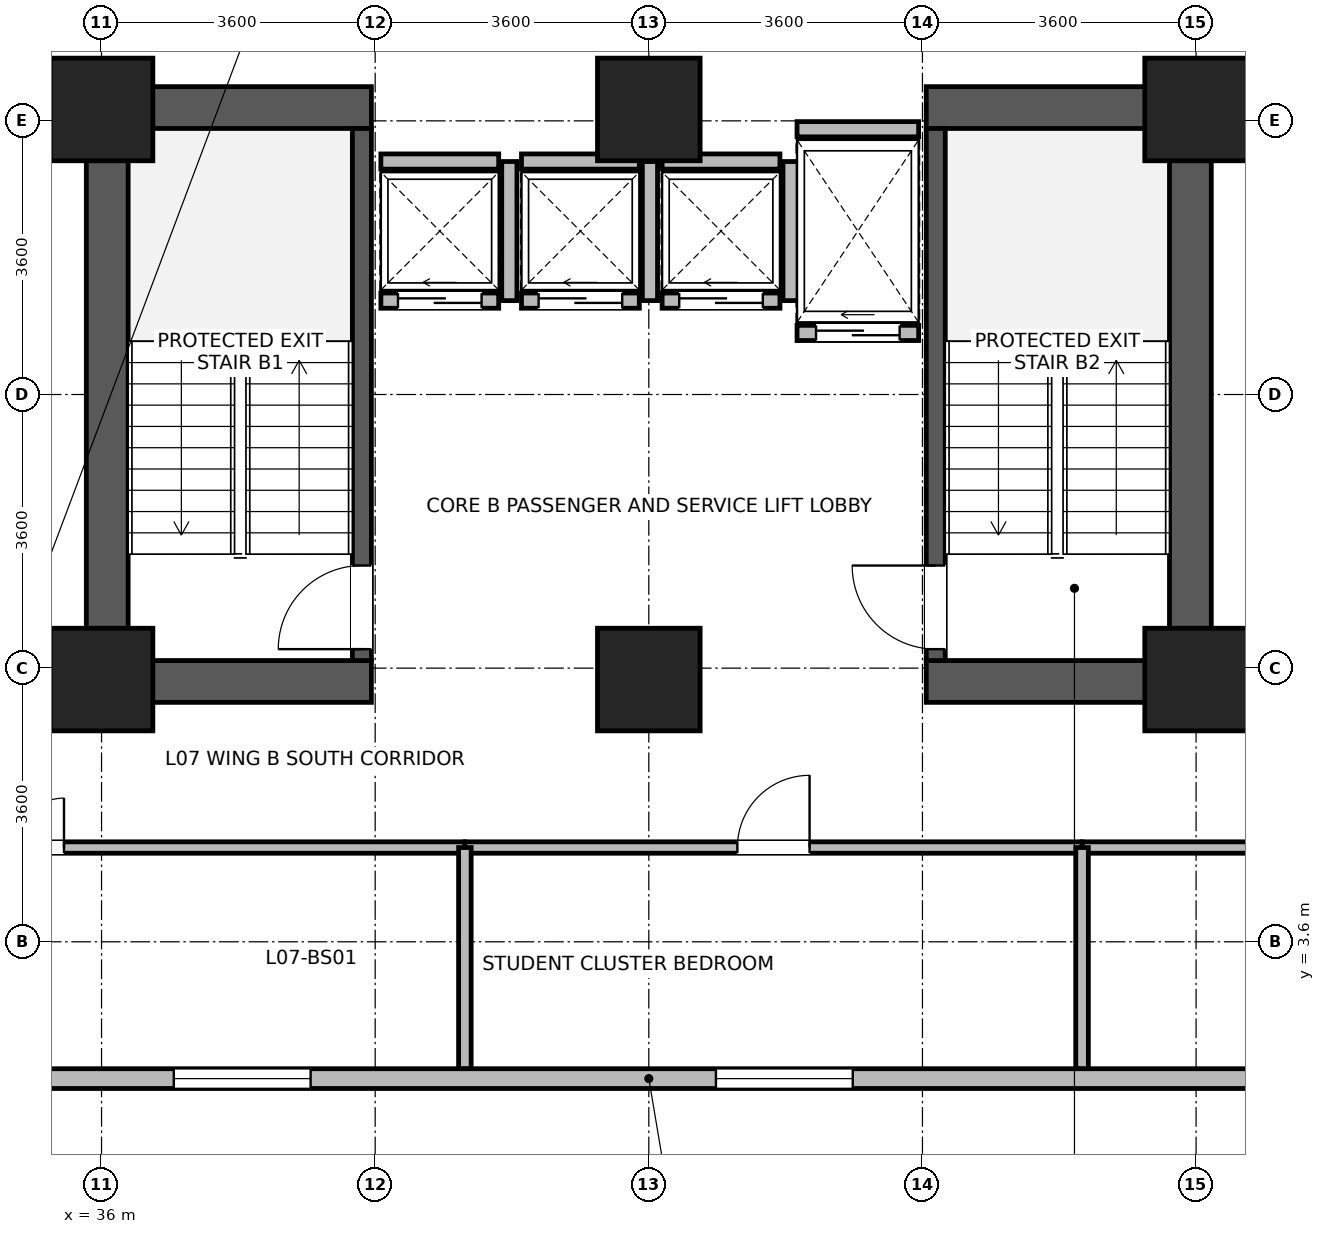
"""IFC4 building model, lengths in metres.
Left out: names, types, materials, properties, quantities, classifications, styles, units other than length and angle.
Written with IfcOpenShell. Run it as: python <this file> out.ifc"""

import sys

from ifc_helpers import new_model, si_unit, direction, frame, frame_2d, origin, origin_2d, place, context, subcontext, project, spatial, rectangle, extrude, source, transform, mapped, element, fill, save


model = new_model("IFC4")
c1 = context("Model", 3, precision=1e-05, world=origin(), true_north=direction((0.0, 1.0)))
c2 = subcontext(c1, "Body", "Model", "MODEL_VIEW")
j1 = project(units=[si_unit("LENGTHUNIT", "METRE"), si_unit("PLANEANGLEUNIT", "RADIAN")], contexts=[c1])
p1 = place(None, origin())
s1 = spatial("IfcSite", under=j1, at=p1, CompositionType="ELEMENT")
p2 = place(p1, origin())
s2 = spatial("IfcBuilding", under=s1, at=p2, CompositionType="ELEMENT")
p3 = place(p2, frame((0.0, 0.0, 32.7)))
s3 = spatial("IfcBuildingStorey", under=s2, at=p3, CompositionType="ELEMENT", Elevation=32.7)
for number, where, z_axis, x_axis in (
    (1, (36.075, 6.75, 0.0), (0.0, 0.0, 1.0), (0.0, 1.0, 0.0)),
    (2, (50.325, 6.75, 0.0), (0.0, 0.0, 1.0), (0.0, 1.0, 0.0)),
):
    element("IfcWall", number, at=place(p3, frame(where, z_axis=z_axis, x_axis=x_axis)), inside=s3, PredefinedType="SHEAR", context=c2, shape_type="SweptSolid", body=[
        extrude(rectangle(XDim=8.1, YDim=0.55, at=frame_2d((4.05, 0.0))), origin(), (0.0, 0.0, 1.0), 3.45),
    ])
for number, where, z_axis, x_axis in (
    (3, (36.35, 7.025, 0.0), (0.0, 0.0, 1.0), (1.0, 0.0, 0.0)),
    (4, (46.85, 7.025, 0.0), (0.0, 0.0, 1.0), (1.0, 0.0, 0.0)),
    (5, (36.35, 14.575, 0.0), (0.0, 0.0, 1.0), (1.0, 0.0, 0.0)),
    (6, (46.85, 14.575, 0.0), (0.0, 0.0, 1.0), (1.0, 0.0, 0.0)),
):
    element("IfcWall", number, at=place(p3, frame(where, z_axis=z_axis, x_axis=x_axis)), inside=s3, PredefinedType="SHEAR", context=c2, shape_type="SweptSolid", body=[
        extrude(rectangle(XDim=3.2, YDim=0.55, at=frame_2d((1.6, 0.0))), origin(), (0.0, 0.0, 1.0), 3.45),
    ])
p4 = place(p3, frame((39.425, 7.3, 0.0), z_axis=(0.0, 0.0, 1.0), x_axis=(0.0, 1.0, 0.0)))
e7 = element("IfcWall", 7, at=p4, inside=s3, PredefinedType="SHEAR", context=c2, shape_type="SweptSolid", body=[
    extrude(rectangle(XDim=7.0, YDim=0.25, at=frame_2d((3.5, 0.0))), origin(), (0.0, 0.0, 1.0), 3.45),
])
p5 = place(p4, frame((0.15, 0.0, 0.0)))
e8 = element("IfcOpeningElement", 8, at=p5, cuts=e7, PredefinedType="OPENING", context=c2, shape_type="SweptSolid", body=[
    extrude(rectangle(XDim=1.1, YDim=2.08, at=frame_2d((0.55, 1.04))), frame((0.0, 0.135, 0.0), z_axis=(0.0, -1.0, 0.0), x_axis=(1.0, 0.0, 0.0)), (0.0, 0.0, 1.0), 0.27),
])
p6 = place(p3, frame((46.975, 7.3, 0.0), z_axis=(0.0, 0.0, 1.0), x_axis=(0.0, 1.0, 0.0)))
e9 = element("IfcWall", 9, at=p6, inside=s3, PredefinedType="SHEAR", context=c2, shape_type="SweptSolid", body=[
    extrude(rectangle(XDim=7.0, YDim=0.25, at=frame_2d((3.5, 0.0))), origin(), (0.0, 0.0, 1.0), 3.45),
])
p7 = place(p6, frame((0.15, 0.0, 0.0)))
e10 = element("IfcOpeningElement", 10, at=p7, cuts=e9, PredefinedType="OPENING", context=c2, shape_type="SweptSolid", body=[
    extrude(rectangle(XDim=1.1, YDim=2.08, at=frame_2d((0.55, 1.04))), frame((0.0, 0.135, 0.0), z_axis=(0.0, -1.0, 0.0), x_axis=(1.0, 0.0, 0.0)), (0.0, 0.0, 1.0), 0.27),
])
m1 = source(origin(), c2, "Body", "SweptSolid", [
    extrude(rectangle(XDim=1.35, YDim=1.35, at=origin_2d()), origin(), (0.0, 0.0, 1.0), 3.7),
])
for number, where, z_axis, x_axis in (
    (11, (36.0, 7.05, 0.0), (0.0, 0.0, 1.0), (1.0, 0.0, 0.0)),
    (12, (36.0, 14.55, 0.0), (0.0, 0.0, 1.0), (1.0, 0.0, 0.0)),
    (13, (43.2, 7.05, 0.0), (0.0, 0.0, 1.0), (1.0, 0.0, 0.0)),
    (14, (43.2, 14.55, 0.0), (0.0, 0.0, 1.0), (1.0, 0.0, 0.0)),
    (15, (50.4, 7.05, 0.0), (0.0, 0.0, 1.0), (1.0, 0.0, 0.0)),
    (16, (50.4, 14.55, 0.0), (0.0, 0.0, 1.0), (1.0, 0.0, 0.0)),
):
    element("IfcColumn", number, at=place(p3, frame(where, z_axis=z_axis, x_axis=x_axis)), inside=s3, PredefinedType="COLUMN", context=c2, shape_type="MappedRepresentation", body=[
        mapped(m1, transform((0.0, 0.0, 0.0), x_axis=(1.0, 0.0, 0.0), y_axis=(0.0, 1.0, 0.0), z_axis=(0.0, 0.0, 1.0), scale=1.0)),
    ])
p8 = place(p3, frame((57.465, 1.8, 0.0), z_axis=(0.0, 0.0, 1.0), x_axis=(-1.0, 0.0, 0.0)))
e17 = element("IfcWall", 17, at=p8, inside=s3, PredefinedType="STANDARD", context=c2, shape_type="SweptSolid", body=[
    extrude(rectangle(XDim=28.53, YDim=0.26, at=frame_2d((14.265, 0.0))), origin(), (0.0, 0.0, 1.0), 3.43),
])
p9 = place(p8, frame((0.883, 0.0, 0.85)))
e18 = element("IfcOpeningElement", 18, at=p9, cuts=e17, PredefinedType="OPENING", context=c2, shape_type="SweptSolid", body=[
    extrude(rectangle(XDim=1.8, YDim=1.85, at=frame_2d((0.9, 0.925))), frame((0.0, 0.14, 0.0), z_axis=(0.0, -1.0, 0.0), x_axis=(1.0, 0.0, 0.0)), (0.0, 0.0, 1.0), 0.28),
])
p10 = place(p8, frame((4.449, 0.0, 0.85)))
e19 = element("IfcOpeningElement", 19, at=p10, cuts=e17, PredefinedType="OPENING", context=c2, shape_type="SweptSolid", body=[
    extrude(rectangle(XDim=1.8, YDim=1.85, at=frame_2d((0.9, 0.925))), frame((0.0, 0.14, 0.0), z_axis=(0.0, -1.0, 0.0), x_axis=(1.0, 0.0, 0.0)), (0.0, 0.0, 1.0), 0.28),
])
p11 = place(p8, frame((11.582, 0.0, 0.85)))
e20 = element("IfcOpeningElement", 20, at=p11, cuts=e17, PredefinedType="OPENING", context=c2, shape_type="SweptSolid", body=[
    extrude(rectangle(XDim=1.8, YDim=1.85, at=frame_2d((0.9, 0.925))), frame((0.0, 0.14, 0.0), z_axis=(0.0, -1.0, 0.0), x_axis=(1.0, 0.0, 0.0)), (0.0, 0.0, 1.0), 0.28),
])
p12 = place(p8, frame((18.714, 0.0, 0.85)))
e21 = element("IfcOpeningElement", 21, at=p12, cuts=e17, PredefinedType="OPENING", context=c2, shape_type="SweptSolid", body=[
    extrude(rectangle(XDim=1.8, YDim=1.85, at=frame_2d((0.9, 0.925))), frame((0.0, 0.14, 0.0), z_axis=(0.0, -1.0, 0.0), x_axis=(1.0, 0.0, 0.0)), (0.0, 0.0, 1.0), 0.28),
])
p13 = place(p8, frame((22.281, 0.0, 0.85)))
e22 = element("IfcOpeningElement", 22, at=p13, cuts=e17, PredefinedType="OPENING", context=c2, shape_type="SweptSolid", body=[
    extrude(rectangle(XDim=1.8, YDim=1.85, at=frame_2d((0.9, 0.925))), frame((0.0, 0.14, 0.0), z_axis=(0.0, -1.0, 0.0), x_axis=(1.0, 0.0, 0.0)), (0.0, 0.0, 1.0), 0.28),
])
p14 = place(p8, frame((25.847, 0.0, 0.85)))
e23 = element("IfcOpeningElement", 23, at=p14, cuts=e17, PredefinedType="OPENING", context=c2, shape_type="SweptSolid", body=[
    extrude(rectangle(XDim=1.8, YDim=1.85, at=frame_2d((0.9, 0.925))), frame((0.0, 0.14, 0.0), z_axis=(0.0, -1.0, 0.0), x_axis=(1.0, 0.0, 0.0)), (0.0, 0.0, 1.0), 0.28),
])
p15 = place(p3, frame((39.675, 12.035, 0.0), z_axis=(0.0, 0.0, 1.0), x_axis=(1.0, 0.0, 0.0)))
e24 = element("IfcWall", 24, at=p15, inside=s3, PredefinedType="PARTITIONING", context=c2, shape_type="SweptSolid", body=[
    extrude(rectangle(XDim=1.55, YDim=0.2, at=frame_2d((0.775, 0.0))), origin(), (0.0, 0.0, 1.0), 3.43),
])
p16 = place(p15, frame((0.225, 0.0, 0.0)))
e25 = element("IfcOpeningElement", 25, at=p16, cuts=e24, PredefinedType="OPENING", context=c2, shape_type="SweptSolid", body=[
    extrude(rectangle(XDim=1.1, YDim=2.12, at=frame_2d((0.55, 1.06))), frame((0.0, 0.11, 0.0), z_axis=(0.0, -1.0, 0.0), x_axis=(1.0, 0.0, 0.0)), (0.0, 0.0, 1.0), 0.22),
])
p17 = place(p3, frame((39.675, 13.865, 0.0), z_axis=(0.0, 0.0, 1.0), x_axis=(1.0, 0.0, 0.0)))
e26 = element("IfcWall", 26, at=p17, inside=s3, PredefinedType="PARTITIONING", context=c2, shape_type="SweptSolid", body=[
    extrude(rectangle(XDim=1.55, YDim=0.2, at=frame_2d((0.775, 0.0))), origin(), (0.0, 0.0, 1.0), 3.43),
])
p18 = place(p3, frame((41.365, 12.035, 0.0), z_axis=(0.0, 0.0, 1.0), x_axis=(0.0, 1.0, 0.0)))
e27 = element("IfcWall", 27, at=p18, inside=s3, PredefinedType="PARTITIONING", context=c2, shape_type="SweptSolid", body=[
    extrude(rectangle(XDim=1.83, YDim=0.2, at=frame_2d((0.915, 0.0))), origin(), (0.0, 0.0, 1.0), 3.43),
])
p19 = place(p3, frame((41.525, 12.035, 0.0), z_axis=(0.0, 0.0, 1.0), x_axis=(1.0, 0.0, 0.0)))
e28 = element("IfcWall", 28, at=p19, inside=s3, PredefinedType="PARTITIONING", context=c2, shape_type="SweptSolid", body=[
    extrude(rectangle(XDim=1.55, YDim=0.2, at=frame_2d((0.775, 0.0))), origin(), (0.0, 0.0, 1.0), 3.43),
])
p20 = place(p19, frame((0.225, 0.0, 0.0)))
e29 = element("IfcOpeningElement", 29, at=p20, cuts=e28, PredefinedType="OPENING", context=c2, shape_type="SweptSolid", body=[
    extrude(rectangle(XDim=1.1, YDim=2.12, at=frame_2d((0.55, 1.06))), frame((0.0, 0.11, 0.0), z_axis=(0.0, -1.0, 0.0), x_axis=(1.0, 0.0, 0.0)), (0.0, 0.0, 1.0), 0.22),
])
p21 = place(p3, frame((41.525, 13.865, 0.0), z_axis=(0.0, 0.0, 1.0), x_axis=(1.0, 0.0, 0.0)))
e30 = element("IfcWall", 30, at=p21, inside=s3, PredefinedType="PARTITIONING", context=c2, shape_type="SweptSolid", body=[
    extrude(rectangle(XDim=1.55, YDim=0.2, at=frame_2d((0.775, 0.0))), origin(), (0.0, 0.0, 1.0), 3.43),
])
p22 = place(p3, frame((43.215, 12.035, 0.0), z_axis=(0.0, 0.0, 1.0), x_axis=(0.0, 1.0, 0.0)))
e31 = element("IfcWall", 31, at=p22, inside=s3, PredefinedType="PARTITIONING", context=c2, shape_type="SweptSolid", body=[
    extrude(rectangle(XDim=1.83, YDim=0.2, at=frame_2d((0.915, 0.0))), origin(), (0.0, 0.0, 1.0), 3.43),
])
p23 = place(p3, frame((43.375, 12.035, 0.0), z_axis=(0.0, 0.0, 1.0), x_axis=(1.0, 0.0, 0.0)))
e32 = element("IfcWall", 32, at=p23, inside=s3, PredefinedType="PARTITIONING", context=c2, shape_type="SweptSolid", body=[
    extrude(rectangle(XDim=1.55, YDim=0.2, at=frame_2d((0.775, 0.0))), origin(), (0.0, 0.0, 1.0), 3.43),
])
p24 = place(p23, frame((0.225, 0.0, 0.0)))
e33 = element("IfcOpeningElement", 33, at=p24, cuts=e32, PredefinedType="OPENING", context=c2, shape_type="SweptSolid", body=[
    extrude(rectangle(XDim=1.1, YDim=2.12, at=frame_2d((0.55, 1.06))), frame((0.0, 0.11, 0.0), z_axis=(0.0, -1.0, 0.0), x_axis=(1.0, 0.0, 0.0)), (0.0, 0.0, 1.0), 0.22),
])
p25 = place(p3, frame((43.375, 13.865, 0.0), z_axis=(0.0, 0.0, 1.0), x_axis=(1.0, 0.0, 0.0)))
e34 = element("IfcWall", 34, at=p25, inside=s3, PredefinedType="PARTITIONING", context=c2, shape_type="SweptSolid", body=[
    extrude(rectangle(XDim=1.55, YDim=0.2, at=frame_2d((0.775, 0.0))), origin(), (0.0, 0.0, 1.0), 3.43),
])
p26 = place(p3, frame((45.065, 12.035, 0.0), z_axis=(0.0, 0.0, 1.0), x_axis=(0.0, 1.0, 0.0)))
e35 = element("IfcWall", 35, at=p26, inside=s3, PredefinedType="PARTITIONING", context=c2, shape_type="SweptSolid", body=[
    extrude(rectangle(XDim=1.83, YDim=0.2, at=frame_2d((0.915, 0.0))), origin(), (0.0, 0.0, 1.0), 3.43),
])
p27 = place(p3, frame((45.15, 11.61, 0.0), z_axis=(0.0, 0.0, 1.0), x_axis=(1.0, 0.0, 0.0)))
e36 = element("IfcWall", 36, at=p27, inside=s3, PredefinedType="PARTITIONING", context=c2, shape_type="SweptSolid", body=[
    extrude(rectangle(XDim=1.6, YDim=0.2, at=frame_2d((0.8, 0.0))), origin(), (0.0, 0.0, 1.0), 3.43),
])
p28 = place(p27, frame((0.25, 0.0, 0.0)))
e37 = element("IfcOpeningElement", 37, at=p28, cuts=e36, PredefinedType="OPENING", context=c2, shape_type="SweptSolid", body=[
    extrude(rectangle(XDim=1.1, YDim=2.12, at=frame_2d((0.55, 1.06))), frame((0.0, 0.11, 0.0), z_axis=(0.0, -1.0, 0.0), x_axis=(1.0, 0.0, 0.0)), (0.0, 0.0, 1.0), 0.22),
])
p29 = place(p3, frame((45.15, 14.29, 0.0), z_axis=(0.0, 0.0, 1.0), x_axis=(1.0, 0.0, 0.0)))
e38 = element("IfcWall", 38, at=p29, inside=s3, PredefinedType="PARTITIONING", context=c2, shape_type="SweptSolid", body=[
    extrude(rectangle(XDim=1.6, YDim=0.2, at=frame_2d((0.8, 0.0))), origin(), (0.0, 0.0, 1.0), 2.23),
])
p30 = place(p3, frame((28.932, 4.84, 0.0), z_axis=(0.0, 0.0, 1.0), x_axis=(1.0, 0.0, 0.0)))
e39 = element("IfcWall", 39, at=p30, inside=s3, PredefinedType="PARTITIONING", context=c2, shape_type="SweptSolid", body=[
    extrude(rectangle(XDim=11.848, YDim=0.15, at=frame_2d((5.924, 0.0))), origin(), (0.0, 0.0, 1.0), 3.43),
])
p31 = place(p30, frame((5.274, 0.0, 0.0)))
e40 = element("IfcOpeningElement", 40, at=p31, cuts=e39, PredefinedType="OPENING", context=c2, shape_type="SweptSolid", body=[
    extrude(rectangle(XDim=1.3, YDim=2.12, at=frame_2d((0.65, 1.06))), frame((0.0, 0.085, 0.0), z_axis=(0.0, -1.0, 0.0), x_axis=(1.0, 0.0, 0.0)), (0.0, 0.0, 1.0), 0.17),
])
p32 = place(p3, frame((48.9, 4.84, 0.0), z_axis=(0.0, 0.0, 1.0), x_axis=(1.0, 0.0, 0.0)))
e41 = element("IfcWall", 41, at=p32, inside=s3, PredefinedType="PARTITIONING", context=c2, shape_type="SweptSolid", body=[
    extrude(rectangle(XDim=8.568, YDim=0.15, at=frame_2d((4.284, 0.0))), origin(), (0.0, 0.0, 1.0), 3.43),
])
p33 = place(p32, frame((3.809, 0.0, 0.0)))
e42 = element("IfcOpeningElement", 42, at=p33, cuts=e41, PredefinedType="OPENING", context=c2, shape_type="SweptSolid", body=[
    extrude(rectangle(XDim=0.95, YDim=2.1, at=frame_2d((0.475, 1.05))), frame((0.0, 0.085, 0.0), z_axis=(0.0, -1.0, 0.0), x_axis=(1.0, 0.0, 0.0)), (0.0, 0.0, 1.0), 0.17),
])
p34 = place(p3, frame((40.78, 4.84, 0.0), z_axis=(0.0, 0.0, 1.0), x_axis=(1.0, 0.0, 0.0)))
e43 = element("IfcWall", 43, at=p34, inside=s3, PredefinedType="PARTITIONING", context=c2, shape_type="SweptSolid", body=[
    extrude(rectangle(XDim=8.12, YDim=0.15, at=frame_2d((4.06, 0.0))), origin(), (0.0, 0.0, 1.0), 3.43),
])
p35 = place(p34, frame((3.585, 0.0, 0.0)))
e44 = element("IfcOpeningElement", 44, at=p35, cuts=e43, PredefinedType="OPENING", context=c2, shape_type="SweptSolid", body=[
    extrude(rectangle(XDim=0.95, YDim=2.1, at=frame_2d((0.475, 1.05))), frame((0.0, 0.085, 0.0), z_axis=(0.0, -1.0, 0.0), x_axis=(1.0, 0.0, 0.0)), (0.0, 0.0, 1.0), 0.17),
])
for number, where, z_axis, x_axis in (
    (45, (40.78, 1.932, 0.0), (0.0, 0.0, 1.0), (0.0, 1.0, 0.0)),
    (46, (48.9, 1.932, 0.0), (0.0, 0.0, 1.0), (0.0, 1.0, 0.0)),
):
    element("IfcWall", number, at=place(p3, frame(where, z_axis=z_axis, x_axis=x_axis)), inside=s3, PredefinedType="PARTITIONING", context=c2, shape_type="SweptSolid", body=[
        extrude(rectangle(XDim=2.908, YDim=0.165, at=frame_2d((1.454, 0.0))), origin(), (0.0, 0.0, 1.0), 3.43),
    ])
p36 = place(p11, origin())
e47 = element("IfcWindow", 47, at=p36, inside=s3, PartitioningType="SINGLE_PANEL", PredefinedType="WINDOW", context=c2, shape_type="SweptSolid", body=[
    extrude(rectangle(XDim=1.8, YDim=1.85, at=frame_2d((0.9, 0.925))), frame((0.0, 0.03, 0.0), z_axis=(0.0, -1.0, 0.0), x_axis=(1.0, 0.0, 0.0)), (0.0, 0.0, 1.0), 0.06),
])
fill(e20, e47)
p37 = place(p12, origin())
e48 = element("IfcWindow", 48, at=p37, inside=s3, PartitioningType="SINGLE_PANEL", PredefinedType="WINDOW", context=c2, shape_type="SweptSolid", body=[
    extrude(rectangle(XDim=1.8, YDim=1.85, at=frame_2d((0.9, 0.925))), frame((0.0, 0.03, 0.0), z_axis=(0.0, -1.0, 0.0), x_axis=(1.0, 0.0, 0.0)), (0.0, 0.0, 1.0), 0.06),
])
fill(e21, e48)
p38 = place(p5, origin())
e49 = element("IfcDoor", 49, at=p38, inside=s3, OperationType="SINGLE_SWING_LEFT", PredefinedType="DOOR", context=c2, shape_type="SweptSolid", body=[
    extrude(rectangle(XDim=1.1, YDim=2.08, at=frame_2d((0.55, 1.04))), frame((0.0, 0.025, 0.0), z_axis=(0.0, -1.0, 0.0), x_axis=(1.0, 0.0, 0.0)), (0.0, 0.0, 1.0), 0.05),
])
fill(e8, e49)
p39 = place(p7, origin())
e50 = element("IfcDoor", 50, at=p39, inside=s3, OperationType="SINGLE_SWING_RIGHT", PredefinedType="DOOR", context=c2, shape_type="SweptSolid", body=[
    extrude(rectangle(XDim=1.1, YDim=2.08, at=frame_2d((0.55, 1.04))), frame((0.0, 0.025, 0.0), z_axis=(0.0, -1.0, 0.0), x_axis=(1.0, 0.0, 0.0)), (0.0, 0.0, 1.0), 0.05),
])
fill(e10, e50)
p40 = place(p16, origin())
e51 = element("IfcDoor", 51, at=p40, inside=s3, OperationType="SLIDING_TO_LEFT", PredefinedType="DOOR", context=c2, shape_type="SweptSolid", body=[
    extrude(rectangle(XDim=1.1, YDim=2.12, at=frame_2d((0.55, 1.06))), frame((0.0, 0.025, 0.0), z_axis=(0.0, -1.0, 0.0), x_axis=(1.0, 0.0, 0.0)), (0.0, 0.0, 1.0), 0.05),
])
fill(e25, e51)
p41 = place(p20, origin())
e52 = element("IfcDoor", 52, at=p41, inside=s3, OperationType="SLIDING_TO_LEFT", PredefinedType="DOOR", context=c2, shape_type="SweptSolid", body=[
    extrude(rectangle(XDim=1.1, YDim=2.12, at=frame_2d((0.55, 1.06))), frame((0.0, 0.025, 0.0), z_axis=(0.0, -1.0, 0.0), x_axis=(1.0, 0.0, 0.0)), (0.0, 0.0, 1.0), 0.05),
])
fill(e29, e52)
p42 = place(p24, origin())
e53 = element("IfcDoor", 53, at=p42, inside=s3, OperationType="SLIDING_TO_LEFT", PredefinedType="DOOR", context=c2, shape_type="SweptSolid", body=[
    extrude(rectangle(XDim=1.1, YDim=2.12, at=frame_2d((0.55, 1.06))), frame((0.0, 0.025, 0.0), z_axis=(0.0, -1.0, 0.0), x_axis=(1.0, 0.0, 0.0)), (0.0, 0.0, 1.0), 0.05),
])
fill(e33, e53)
p43 = place(p28, origin())
e54 = element("IfcDoor", 54, at=p43, inside=s3, OperationType="SLIDING_TO_LEFT", PredefinedType="DOOR", context=c2, shape_type="SweptSolid", body=[
    extrude(rectangle(XDim=1.1, YDim=2.12, at=frame_2d((0.55, 1.06))), frame((0.0, 0.025, 0.0), z_axis=(0.0, -1.0, 0.0), x_axis=(1.0, 0.0, 0.0)), (0.0, 0.0, 1.0), 0.05),
])
fill(e37, e54)
p44 = place(p31, origin())
e55 = element("IfcDoor", 55, at=p44, inside=s3, OperationType="DOUBLE_DOOR_SINGLE_SWING", PredefinedType="DOOR", context=c2, shape_type="SweptSolid", body=[
    extrude(rectangle(XDim=1.3, YDim=2.12, at=frame_2d((0.65, 1.06))), frame((0.0, 0.025, 0.0), z_axis=(0.0, -1.0, 0.0), x_axis=(1.0, 0.0, 0.0)), (0.0, 0.0, 1.0), 0.05),
])
fill(e40, e55)
p45 = place(p35, origin())
e56 = element("IfcDoor", 56, at=p45, inside=s3, OperationType="SINGLE_SWING_RIGHT", PredefinedType="DOOR", context=c2, shape_type="SweptSolid", body=[
    extrude(rectangle(XDim=0.95, YDim=2.1, at=frame_2d((0.475, 1.05))), frame((0.0, 0.025, 0.0), z_axis=(0.0, -1.0, 0.0), x_axis=(1.0, 0.0, 0.0)), (0.0, 0.0, 1.0), 0.05),
])
fill(e44, e56)
save(model, sys.argv[1])
